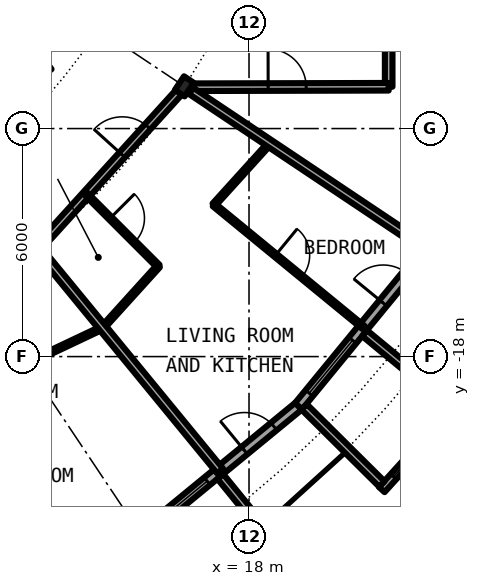
"""IFC4 building model, lengths in metres.
Left out: names, types, materials, properties, quantities, classifications, styles, units other than length and angle.
Written with IfcOpenShell. Run it as: python <this file> out.ifc"""

import sys

from ifc_helpers import new_model, si_unit, direction, frame, frame_2d, origin, origin_2d, place, context, subcontext, project, spatial, rectangle, circle, i_section, extrude, element, fill, save


model = new_model("IFC4")
c1 = context("Model", 3, precision=1e-05, world=origin(), true_north=direction((0.0, 1.0)))
c2 = subcontext(c1, "Body", "Model", "MODEL_VIEW")
j1 = project(units=[si_unit("LENGTHUNIT", "METRE"), si_unit("PLANEANGLEUNIT", "RADIAN")], contexts=[c1])
p1 = place(None, origin())
s1 = spatial("IfcSite", under=j1, at=p1, CompositionType="ELEMENT")
p2 = place(p1, origin())
s2 = spatial("IfcBuilding", under=s1, at=p2, CompositionType="ELEMENT")
p3 = place(p2, frame((0.0, 0.0, 111.65)))
s3 = spatial("IfcBuildingStorey", under=s2, at=p3, CompositionType="ELEMENT", Elevation=111.65)
p4 = place(p3, frame((16.297, -10.889, 0.0), z_axis=(0.0, 0.0, 1.0), x_axis=(0.831469612303, -0.55557023302, 0.0)))
e1 = element("IfcColumn", 1, at=p4, inside=s3, PredefinedType="COLUMN", context=c2, shape_type="SweptSolid", body=[
    extrude(i_section(OverallWidth=0.307, OverallDepth=0.432, WebThickness=0.021, FlangeThickness=0.04, FilletRadius=0.027, at=origin_2d()), origin(), (0.0, 0.0, 1.0), 3.05),
])
p5 = place(p3, frame((15.167, -22.699, 0.0), z_axis=(0.0, 0.0, 1.0), x_axis=(0.773019449054, 0.634382322723, 0.0)))
e2 = element("IfcWall", 2, at=p5, inside=s3, PredefinedType="SOLIDWALL", context=c2, shape_type="SweptSolid", body=[
    extrude(rectangle(XDim=5.352, YDim=0.25, at=frame_2d((2.676, 0.0))), origin(), (0.0, 0.0, 1.0), 2.7),
])
p6 = place(p5, frame((0.441, 0.0, 0.3)))
e3 = element("IfcOpeningElement", 3, at=p6, cuts=e2, PredefinedType="OPENING", context=c2, shape_type="SweptSolid", body=[
    extrude(rectangle(XDim=1.8, YDim=2.1, at=frame_2d((0.9, 1.05))), frame((0.0, 0.135, 0.0), z_axis=(0.0, -1.0, 0.0), x_axis=(1.0, 0.0, 0.0)), (0.0, 0.0, 1.0), 0.27),
])
p7 = place(p5, frame((3.51, 0.0, 0.0)))
e4 = element("IfcOpeningElement", 4, at=p7, cuts=e2, PredefinedType="OPENING", context=c2, shape_type="SweptSolid", body=[
    extrude(rectangle(XDim=1.0, YDim=2.2, at=frame_2d((0.5, 1.1))), frame((0.0, 0.135, 0.0), z_axis=(0.0, -1.0, 0.0), x_axis=(1.0, 0.0, 0.0)), (0.0, 0.0, 1.0), 0.27),
])
p8 = place(p3, frame((17.246, -21.155, -0.03), z_axis=(0.0, 0.0, 1.0), x_axis=(0.631741648902, -0.775179004516, 0.0)))
e5 = element("IfcWall", 5, at=p8, inside=s3, PredefinedType="SOLIDWALL", context=c2, shape_type="SweptSolid", body=[
    extrude(rectangle(XDim=3.006, YDim=0.2, at=frame_2d((1.503, 0.0))), origin(), (0.0, 0.0, 1.0), 2.73),
])
p9 = place(p3, frame((19.304, -19.304, 0.0), z_axis=(0.0, 0.0, 1.0), x_axis=(0.634382322723, 0.773019449054, 0.0)))
e6 = element("IfcWall", 6, at=p9, inside=s3, PredefinedType="SOLIDWALL", context=c2, shape_type="SweptSolid", body=[
    extrude(rectangle(XDim=5.352, YDim=0.25, at=frame_2d((2.676, 0.0))), origin(), (0.0, 0.0, 1.0), 2.7),
])
p10 = place(p9, frame((0.441, 0.0, 0.3)))
e7 = element("IfcOpeningElement", 7, at=p10, cuts=e6, PredefinedType="OPENING", context=c2, shape_type="SweptSolid", body=[
    extrude(rectangle(XDim=1.8, YDim=2.1, at=frame_2d((0.9, 1.05))), frame((0.0, 0.135, 0.0), z_axis=(0.0, -1.0, 0.0), x_axis=(1.0, 0.0, 0.0)), (0.0, 0.0, 1.0), 0.27),
])
p11 = place(p9, frame((3.51, 0.0, 0.0)))
e8 = element("IfcOpeningElement", 8, at=p11, cuts=e6, PredefinedType="OPENING", context=c2, shape_type="SweptSolid", body=[
    extrude(rectangle(XDim=1.0, YDim=2.2, at=frame_2d((0.5, 1.1))), frame((0.0, 0.135, 0.0), z_axis=(0.0, -1.0, 0.0), x_axis=(1.0, 0.0, 0.0)), (0.0, 0.0, 1.0), 0.27),
])
p12 = place(p3, frame((21.493, -21.5, -0.03), z_axis=(0.0, 0.0, 1.0), x_axis=(0.671506829416, 0.740998365753, 0.0)))
e9 = element("IfcWall", 9, at=p12, inside=s3, PredefinedType="SOLIDWALL", context=c2, shape_type="SweptSolid", body=[
    extrude(rectangle(XDim=2.993, YDim=0.2, at=frame_2d((1.497, 0.0))), origin(), (0.0, 0.0, 1.0), 2.73),
])
p13 = place(p12, frame((0.457, 0.0, 0.33)))
e10 = element("IfcOpeningElement", 10, at=p13, cuts=e9, PredefinedType="OPENING", context=c2, shape_type="SweptSolid", body=[
    extrude(circle(Radius=1.04, at=frame_2d((1.04, 1.04))), frame((0.0, 0.11, 0.0), z_axis=(0.0, -1.0, 0.0), x_axis=(1.0, 0.0, 0.0)), (0.0, 0.0, 1.0), 0.22),
])
p14 = place(p3, frame((19.45, -19.323, -0.03), z_axis=(0.0, 0.0, 1.0), x_axis=(0.709727076896, -0.704476739375, 0.0)))
e11 = element("IfcWall", 11, at=p14, inside=s3, PredefinedType="SOLIDWALL", context=c2, shape_type="SweptSolid", body=[
    extrude(rectangle(XDim=2.883, YDim=0.2, at=frame_2d((1.441, 0.0))), origin(), (0.0, 0.0, 1.0), 2.73),
])
p15 = place(p3, frame((21.041, -17.384, -0.03), z_axis=(0.0, 0.0, 1.0), x_axis=(0.770784861449, -0.63709551667, 0.0)))
e12 = element("IfcWall", 12, at=p15, inside=s3, PredefinedType="SOLIDWALL", context=c2, shape_type="SweptSolid", body=[
    extrude(rectangle(XDim=3.006, YDim=0.2, at=frame_2d((1.503, 0.0))), origin(), (0.0, 0.0, 1.0), 2.73),
])
p16 = place(p3, frame((14.153, -17.234, 0.0), z_axis=(0.0, 0.0, 1.0), x_axis=(0.671144831591, 0.741326254107, 0.0)))
e13 = element("IfcWall", 13, at=p16, inside=s3, PredefinedType="PARTITIONING", context=c2, shape_type="SweptSolid", body=[
    extrude(rectangle(XDim=2.181, YDim=0.1, at=frame_2d((1.091, 0.0))), origin(), (0.0, 0.0, 1.0), 2.7),
])
p17 = place(p3, frame((17.077, -14.006, 0.0), z_axis=(0.0, 0.0, 1.0), x_axis=(0.671396556615, 0.741098282123, 0.0)))
e14 = element("IfcWall", 14, at=p17, inside=s3, PredefinedType="PARTITIONING", context=c2, shape_type="SweptSolid", body=[
    extrude(rectangle(XDim=2.182, YDim=0.1, at=frame_2d((1.091, 0.0))), origin(), (0.0, 0.0, 1.0), 2.7),
])
p18 = place(p3, frame((21.675, -10.9, 0.0), z_axis=(0.0, 0.0, 1.0), x_axis=(0.0, 1.0, 0.0)))
e15 = element("IfcWall", 15, at=p18, inside=s3, PredefinedType="PARTITIONING", context=c2, shape_type="SweptSolid", body=[
    extrude(rectangle(XDim=1.7, YDim=0.2, at=frame_2d((0.85, 0.0))), origin(), (0.0, 0.0, 1.0), 2.7),
])
p19 = place(p3, frame((12.188, -18.165, 0.0), z_axis=(0.0, 0.0, 1.0), x_axis=(0.903905215872, 0.427732814639, 0.0)))
e16 = element("IfcWall", 16, at=p19, inside=s3, PredefinedType="PARTITIONING", context=c2, shape_type="SweptSolid", body=[
    extrude(rectangle(XDim=2.167, YDim=0.1, at=frame_2d((1.083, 0.0))), origin(), (0.0, 0.0, 1.0), 2.7),
])
p20 = place(p3, frame((12.434, -15.151, 0.0), z_axis=(0.0, 0.0, 1.0), x_axis=(0.671481997275, 0.741020868354, 0.0)))
e17 = element("IfcWall", 17, at=p20, inside=s3, PredefinedType="PARTITIONING", context=c2, shape_type="SweptSolid", body=[
    extrude(rectangle(XDim=5.596, YDim=0.2, at=frame_2d((2.798, 0.0))), origin(), (0.0, 0.0, 1.0), 2.39),
])
p21 = place(p20, frame((3.319, 0.0, 0.0)))
e18 = element("IfcOpeningElement", 18, at=p21, cuts=e17, PredefinedType="OPENING", context=c2, shape_type="SweptSolid", body=[
    extrude(rectangle(XDim=1.0, YDim=2.3, at=frame_2d((0.5, 1.15))), frame((0.0, 0.11, 0.0), z_axis=(0.0, -1.0, 0.0), x_axis=(1.0, 0.0, 0.0)), (0.0, 0.0, 1.0), 0.22),
])
p22 = place(p3, frame((16.541, -10.912, 0.0), z_axis=(0.0, 0.0, 1.0), x_axis=(0.999997173357, 0.002377662213, 0.0)))
e19 = element("IfcWall", 19, at=p22, inside=s3, PredefinedType="PARTITIONING", context=c2, shape_type="SweptSolid", body=[
    extrude(rectangle(XDim=5.134, YDim=0.2, at=frame_2d((2.567, 0.0))), origin(), (0.0, 0.0, 1.0), 2.7),
])
p23 = place(p22, frame((1.963, 0.0, 0.0)))
e20 = element("IfcOpeningElement", 20, at=p23, cuts=e19, PredefinedType="OPENING", context=c2, shape_type="SweptSolid", body=[
    extrude(rectangle(XDim=1.0, YDim=2.3, at=frame_2d((0.5, 1.15))), frame((0.0, 0.11, 0.0), z_axis=(0.0, -1.0, 0.0), x_axis=(1.0, 0.0, 0.0)), (0.0, 0.0, 1.0), 0.22),
])
p24 = place(p3, frame((12.432, -15.152, 0.0), z_axis=(0.0, 0.0, 1.0), x_axis=(0.634353152115, -0.77304338714, 0.0)))
e21 = element("IfcWall", 21, at=p24, inside=s3, PredefinedType="PARTITIONING", context=c2, shape_type="SweptSolid", body=[
    extrude(rectangle(XDim=7.576, YDim=0.2, at=frame_2d((3.788, 0.0))), origin(), (0.0, 0.0, 1.0), 2.7),
])
p25 = place(p3, frame((13.722, -13.73, 0.0), z_axis=(0.0, 0.0, 1.0), x_axis=(0.706741540154, -0.707471833659, 0.0)))
e22 = element("IfcWall", 22, at=p25, inside=s3, PredefinedType="PARTITIONING", context=c2, shape_type="SweptSolid", body=[
    extrude(rectangle(XDim=2.674, YDim=0.1, at=frame_2d((1.337, 0.0))), origin(), (0.0, 0.0, 1.0), 2.7),
])
p26 = place(p25, frame((0.887, 0.0, 0.0)))
e23 = element("IfcOpeningElement", 23, at=p26, cuts=e22, PredefinedType="OPENING", context=c2, shape_type="SweptSolid", body=[
    extrude(rectangle(XDim=0.9, YDim=2.3, at=frame_2d((0.45, 1.15))), frame((0.0, 0.06, 0.0), z_axis=(0.0, -1.0, 0.0), x_axis=(1.0, 0.0, 0.0)), (0.0, 0.0, 1.0), 0.12),
])
p27 = place(p3, frame((16.477, -11.009, 0.0), z_axis=(0.0, 0.0, 1.0), x_axis=(0.831467903109, -0.555572791, 0.0)))
e24 = element("IfcWall", 24, at=p27, inside=s3, PredefinedType="PARTITIONING", context=c2, shape_type="SweptSolid", body=[
    extrude(rectangle(XDim=7.358, YDim=0.2, at=frame_2d((3.679, 0.0))), origin(), (0.0, 0.0, 1.0), 2.7),
])
p28 = place(p3, frame((17.077, -14.006, 0.0), z_axis=(0.0, 0.0, 1.0), x_axis=(0.77326214499, -0.634086472908, 0.0)))
e25 = element("IfcWall", 25, at=p28, inside=s3, PredefinedType="PARTITIONING", context=c2, shape_type="SweptSolid", body=[
    extrude(rectangle(XDim=5.089, YDim=0.1, at=frame_2d((2.544, 0.0))), origin(), (0.0, 0.0, 1.0), 2.7),
])
p29 = place(p28, frame((2.094, 0.0, 0.0)))
e26 = element("IfcOpeningElement", 26, at=p29, cuts=e25, PredefinedType="OPENING", context=c2, shape_type="SweptSolid", body=[
    extrude(rectangle(XDim=0.9, YDim=2.3, at=frame_2d((0.45, 1.15))), frame((0.0, 0.06, 0.0), z_axis=(0.0, -1.0, 0.0), x_axis=(1.0, 0.0, 0.0)), (0.0, 0.0, 1.0), 0.12),
])
p30 = place(p6, origin())
e27 = element("IfcWindow", 27, at=p30, inside=s3, PartitioningType="SINGLE_PANEL", PredefinedType="WINDOW", context=c2, shape_type="SweptSolid", body=[
    extrude(rectangle(XDim=1.8, YDim=2.1, at=frame_2d((0.9, 1.05))), frame((0.0, 0.03, 0.0), z_axis=(0.0, -1.0, 0.0), x_axis=(1.0, 0.0, 0.0)), (0.0, 0.0, 1.0), 0.06),
])
fill(e3, e27)
p31 = place(p7, origin())
e28 = element("IfcDoor", 28, at=p31, inside=s3, OperationType="SINGLE_SWING_LEFT", PredefinedType="DOOR", context=c2, shape_type="SweptSolid", body=[
    extrude(rectangle(XDim=1.0, YDim=2.2, at=frame_2d((0.5, 1.1))), frame((0.0, 0.025, 0.0), z_axis=(0.0, -1.0, 0.0), x_axis=(1.0, 0.0, 0.0)), (0.0, 0.0, 1.0), 0.05),
])
fill(e4, e28)
p32 = place(p10, origin())
e29 = element("IfcWindow", 29, at=p32, inside=s3, PartitioningType="SINGLE_PANEL", PredefinedType="WINDOW", context=c2, shape_type="SweptSolid", body=[
    extrude(rectangle(XDim=1.8, YDim=2.1, at=frame_2d((0.9, 1.05))), frame((0.0, 0.03, 0.0), z_axis=(0.0, -1.0, 0.0), x_axis=(1.0, 0.0, 0.0)), (0.0, 0.0, 1.0), 0.06),
])
fill(e7, e29)
p33 = place(p13, origin())
e30 = element("IfcWindow", 30, at=p33, inside=s3, PartitioningType="SINGLE_PANEL", PredefinedType="WINDOW", context=c2, shape_type="SweptSolid", body=[
    extrude(circle(Radius=1.04, at=frame_2d((1.04, 1.04))), frame((0.0, 0.03, 0.0), z_axis=(0.0, -1.0, 0.0), x_axis=(1.0, 0.0, 0.0)), (0.0, 0.0, 1.0), 0.06),
])
fill(e10, e30)
p34 = place(p11, origin())
e31 = element("IfcDoor", 31, at=p34, inside=s3, OperationType="SINGLE_SWING_LEFT", PredefinedType="DOOR", context=c2, shape_type="SweptSolid", body=[
    extrude(rectangle(XDim=1.0, YDim=2.2, at=frame_2d((0.5, 1.1))), frame((0.0, 0.025, 0.0), z_axis=(0.0, -1.0, 0.0), x_axis=(1.0, 0.0, 0.0)), (0.0, 0.0, 1.0), 0.05),
])
fill(e8, e31)
p35 = place(p21, origin())
e32 = element("IfcDoor", 32, at=p35, inside=s3, OperationType="SINGLE_SWING_RIGHT", PredefinedType="DOOR", context=c2, shape_type="SweptSolid", body=[
    extrude(rectangle(XDim=1.0, YDim=2.3, at=frame_2d((0.5, 1.15))), frame((0.0, 0.025, 0.0), z_axis=(0.0, -1.0, 0.0), x_axis=(1.0, 0.0, 0.0)), (0.0, 0.0, 1.0), 0.05),
])
fill(e18, e32)
p36 = place(p26, origin())
e33 = element("IfcDoor", 33, at=p36, inside=s3, OperationType="SINGLE_SWING_RIGHT", PredefinedType="DOOR", context=c2, shape_type="SweptSolid", body=[
    extrude(rectangle(XDim=0.9, YDim=2.3, at=frame_2d((0.45, 1.15))), frame((0.0, 0.025, 0.0), z_axis=(0.0, -1.0, 0.0), x_axis=(1.0, 0.0, 0.0)), (0.0, 0.0, 1.0), 0.05),
])
fill(e23, e33)
p37 = place(p29, origin())
e34 = element("IfcDoor", 34, at=p37, inside=s3, OperationType="SINGLE_SWING_LEFT", PredefinedType="DOOR", context=c2, shape_type="SweptSolid", body=[
    extrude(rectangle(XDim=0.9, YDim=2.3, at=frame_2d((0.45, 1.15))), frame((0.0, 0.025, 0.0), z_axis=(0.0, -1.0, 0.0), x_axis=(1.0, 0.0, 0.0)), (0.0, 0.0, 1.0), 0.05),
])
fill(e26, e34)
p38 = place(p23, origin())
e35 = element("IfcDoor", 35, at=p38, inside=s3, OperationType="SINGLE_SWING_LEFT", PredefinedType="DOOR", context=c2, shape_type="SweptSolid", body=[
    extrude(rectangle(XDim=1.0, YDim=2.3, at=frame_2d((0.5, 1.15))), frame((0.0, 0.025, 0.0), z_axis=(0.0, -1.0, 0.0), x_axis=(1.0, 0.0, 0.0)), (0.0, 0.0, 1.0), 0.05),
])
fill(e20, e35)
save(model, sys.argv[1])
